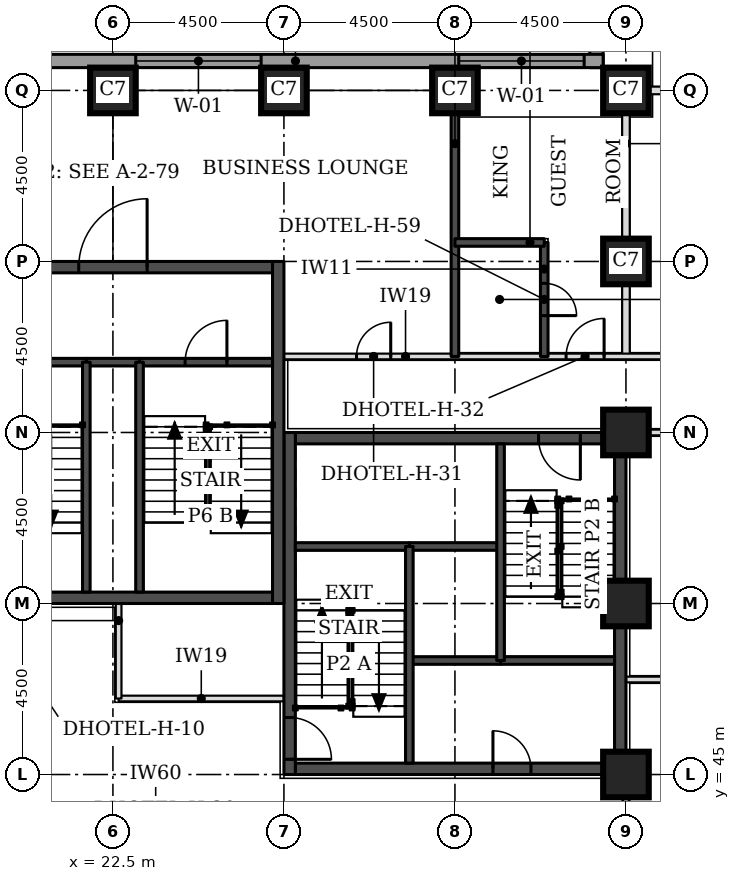
"""IFC4 building model, lengths in metres.
Left out: names, types, materials, properties, quantities, classifications, styles, units other than length and angle.
Written with IfcOpenShell. Run it as: python <this file> out.ifc"""

import sys

from ifc_helpers import new_model, si_unit, direction, frame, frame_2d, origin, origin_2d, place, context, subcontext, project, spatial, rectangle, extrude, element, fill, save


model = new_model("IFC4")
c1 = context("Model", 3, precision=1e-05, world=origin(), true_north=direction((0.0, 1.0)))
c2 = subcontext(c1, "Body", "Model", "MODEL_VIEW")
j1 = project(units=[si_unit("LENGTHUNIT", "METRE"), si_unit("PLANEANGLEUNIT", "RADIAN")], contexts=[c1])
p1 = place(None, origin())
s1 = spatial("IfcSite", under=j1, at=p1, CompositionType="ELEMENT")
p2 = place(p1, origin())
s2 = spatial("IfcBuilding", under=s1, at=p2, CompositionType="ELEMENT")
p3 = place(p2, frame((0.0, 0.0, 46.2)))
s3 = spatial("IfcBuildingStorey", under=s2, at=p3, CompositionType="ELEMENT", Elevation=46.2)
for number, where, z_axis, x_axis in (
    (1, (36.0, 45.0, 0.0), (0.0, 0.0, 1.0), (1.0, 0.0, 0.0)),
    (2, (36.0, 49.5, 0.0), (0.0, 0.0, 1.0), (1.0, 0.0, 0.0)),
    (3, (36.0, 54.0, 0.0), (0.0, 0.0, 1.0), (1.0, 0.0, 0.0)),
    (4, (36.0, 58.5, 0.0), (0.0, 0.0, 1.0), (1.0, 0.0, 0.0)),
    (5, (22.5, 63.0, 0.0), (0.0, 0.0, 1.0), (1.0, 0.0, 0.0)),
    (6, (27.0, 63.0, 0.0), (0.0, 0.0, 1.0), (1.0, 0.0, 0.0)),
    (7, (31.5, 63.0, 0.0), (0.0, 0.0, 1.0), (1.0, 0.0, 0.0)),
    (8, (36.0, 63.0, 0.0), (0.0, 0.0, 1.0), (1.0, 0.0, 0.0)),
):
    element("IfcColumn", number, at=place(p3, frame(where, z_axis=z_axis, x_axis=x_axis)), inside=s3, PredefinedType="COLUMN", context=c2, shape_type="SweptSolid", body=[
        extrude(rectangle(XDim=1.2, YDim=1.2, at=origin_2d()), origin(), (0.0, 0.0, 1.0), 3.3),
    ])
p4 = place(p3, frame((27.3, 45.15, 0.0), z_axis=(0.0, 0.0, 1.0), x_axis=(1.0, 0.0, 0.0)))
e9 = element("IfcWall", 9, at=p4, inside=s3, PredefinedType="SHEAR", context=c2, shape_type="SweptSolid", body=[
    extrude(rectangle(XDim=8.4, YDim=0.3, at=frame_2d((4.2, 0.0))), origin(), (0.0, 0.0, 1.0), 3.3),
])
p5 = place(p4, frame((5.2, 0.0, 0.0)))
e10 = element("IfcOpeningElement", 10, at=p5, cuts=e9, PredefinedType="OPENING", context=c2, shape_type="SweptSolid", body=[
    extrude(rectangle(XDim=1.0, YDim=2.1, at=frame_2d((0.5, 1.05))), frame((0.0, 0.16, 0.0), z_axis=(0.0, -1.0, 0.0), x_axis=(1.0, 0.0, 0.0)), (0.0, 0.0, 1.0), 0.32),
])
p6 = place(p3, frame((27.3, 53.85, 0.0), z_axis=(0.0, 0.0, 1.0), x_axis=(1.0, 0.0, 0.0)))
e11 = element("IfcWall", 11, at=p6, inside=s3, PredefinedType="SHEAR", context=c2, shape_type="SweptSolid", body=[
    extrude(rectangle(XDim=8.4, YDim=0.3, at=frame_2d((4.2, 0.0))), origin(), (0.0, 0.0, 1.0), 3.3),
])
p7 = place(p6, frame((6.4, 0.0, 0.0)))
e12 = element("IfcOpeningElement", 12, at=p7, cuts=e11, PredefinedType="OPENING", context=c2, shape_type="SweptSolid", body=[
    extrude(rectangle(XDim=1.1, YDim=2.1, at=frame_2d((0.55, 1.05))), frame((0.0, 0.16, 0.0), z_axis=(0.0, -1.0, 0.0), x_axis=(1.0, 0.0, 0.0)), (0.0, 0.0, 1.0), 0.32),
])
p8 = place(p3, frame((27.15, 45.0, 0.0), z_axis=(0.0, 0.0, 1.0), x_axis=(0.0, 1.0, 0.0)))
e13 = element("IfcWall", 13, at=p8, inside=s3, PredefinedType="SHEAR", context=c2, shape_type="SweptSolid", body=[
    extrude(rectangle(XDim=9.0, YDim=0.3, at=frame_2d((4.5, 0.0))), origin(), (0.0, 0.0, 1.0), 3.3),
])
p9 = place(p8, frame((0.4, 0.0, 0.0)))
e14 = element("IfcOpeningElement", 14, at=p9, cuts=e13, PredefinedType="OPENING", context=c2, shape_type="SweptSolid", body=[
    extrude(rectangle(XDim=1.1, YDim=2.1, at=frame_2d((0.55, 1.05))), frame((0.0, 0.16, 0.0), z_axis=(0.0, -1.0, 0.0), x_axis=(1.0, 0.0, 0.0)), (0.0, 0.0, 1.0), 0.32),
])
p10 = place(p3, frame((35.85, 45.0, 0.0), z_axis=(0.0, 0.0, 1.0), x_axis=(0.0, 1.0, 0.0)))
e15 = element("IfcWall", 15, at=p10, inside=s3, PredefinedType="SHEAR", context=c2, shape_type="SweptSolid", body=[
    extrude(rectangle(XDim=9.0, YDim=0.3, at=frame_2d((4.5, 0.0))), origin(), (0.0, 0.0, 1.0), 3.3),
])
p11 = place(p3, frame((18.3, 49.65, 0.0), z_axis=(0.0, 0.0, 1.0), x_axis=(1.0, 0.0, 0.0)))
e16 = element("IfcWall", 16, at=p11, inside=s3, PredefinedType="SHEAR", context=c2, shape_type="SweptSolid", body=[
    extrude(rectangle(XDim=8.4, YDim=0.3, at=frame_2d((4.2, 0.0))), origin(), (0.0, 0.0, 1.0), 3.3),
])
p12 = place(p3, frame((18.3, 58.35, 0.0), z_axis=(0.0, 0.0, 1.0), x_axis=(1.0, 0.0, 0.0)))
e17 = element("IfcWall", 17, at=p12, inside=s3, PredefinedType="SHEAR", context=c2, shape_type="SweptSolid", body=[
    extrude(rectangle(XDim=8.4, YDim=0.3, at=frame_2d((4.2, 0.0))), origin(), (0.0, 0.0, 1.0), 3.3),
])
p13 = place(p12, frame((3.3, 0.0, 0.0)))
e18 = element("IfcOpeningElement", 18, at=p13, cuts=e17, PredefinedType="OPENING", context=c2, shape_type="SweptSolid", body=[
    extrude(rectangle(XDim=1.8, YDim=2.1, at=frame_2d((0.9, 1.05))), frame((0.0, 0.16, 0.0), z_axis=(0.0, -1.0, 0.0), x_axis=(1.0, 0.0, 0.0)), (0.0, 0.0, 1.0), 0.32),
])
p14 = place(p3, frame((26.85, 49.5, 0.0), z_axis=(0.0, 0.0, 1.0), x_axis=(0.0, 1.0, 0.0)))
e19 = element("IfcWall", 19, at=p14, inside=s3, PredefinedType="SHEAR", context=c2, shape_type="SweptSolid", body=[
    extrude(rectangle(XDim=9.0, YDim=0.3, at=frame_2d((4.5, 0.0))), origin(), (0.0, 0.0, 1.0), 3.3),
])
p15 = place(p3, frame((35.225, 76.894, 0.0), z_axis=(0.0, 0.0, 1.0), x_axis=(0.0, -1.0, 0.0)))
e20 = element("IfcWall", 20, at=p15, inside=s3, PredefinedType="STANDARD", context=c2, shape_type="SweptSolid", body=[
    extrude(rectangle(XDim=13.293, YDim=0.35, at=frame_2d((6.647, 0.0))), origin(), (0.0, 0.0, 1.0), 3.055),
])
p16 = place(p15, frame((9.493, 0.0, 0.8)))
e21 = element("IfcOpeningElement", 21, at=p16, cuts=e20, PredefinedType="OPENING", context=c2, shape_type="SweptSolid", body=[
    extrude(rectangle(XDim=3.3, YDim=1.5, at=frame_2d((1.65, 0.75))), frame((0.0, 0.185, 0.0), z_axis=(0.0, -1.0, 0.0), x_axis=(1.0, 0.0, 0.0)), (0.0, 0.0, 1.0), 0.37),
])
p17 = place(p3, frame((35.4, 63.775, 0.0), z_axis=(0.0, 0.0, 1.0), x_axis=(-1.0, 0.0, 0.0)))
e22 = element("IfcWall", 22, at=p17, inside=s3, PredefinedType="STANDARD", context=c2, shape_type="SweptSolid", body=[
    extrude(rectangle(XDim=17.793, YDim=0.35, at=frame_2d((8.897, 0.0))), origin(), (0.0, 0.0, 1.0), 3.055),
])
p18 = place(p17, frame((0.5, 0.0, 0.8)))
e23 = element("IfcOpeningElement", 23, at=p18, cuts=e22, PredefinedType="OPENING", context=c2, shape_type="SweptSolid", body=[
    extrude(rectangle(XDim=3.3, YDim=1.5, at=frame_2d((1.65, 0.75))), frame((0.0, 0.185, 0.0), z_axis=(0.0, -1.0, 0.0), x_axis=(1.0, 0.0, 0.0)), (0.0, 0.0, 1.0), 0.37),
])
p19 = place(p17, frame((9.0, 0.0, 0.8)))
e24 = element("IfcOpeningElement", 24, at=p19, cuts=e22, PredefinedType="OPENING", context=c2, shape_type="SweptSolid", body=[
    extrude(rectangle(XDim=3.3, YDim=1.5, at=frame_2d((1.65, 0.75))), frame((0.0, 0.185, 0.0), z_axis=(0.0, -1.0, 0.0), x_axis=(1.0, 0.0, 0.0)), (0.0, 0.0, 1.0), 0.37),
])
p20 = place(p3, frame((36.0, 56.0, 0.0), z_axis=(0.0, 0.0, 1.0), x_axis=(0.0, 1.0, 0.0)))
e25 = element("IfcWall", 25, at=p20, inside=s3, PredefinedType="PARTITIONING", context=c2, shape_type="SweptSolid", body=[
    extrude(rectangle(XDim=6.4, YDim=0.2, at=frame_2d((3.2, 0.0))), origin(), (0.0, 0.0, 1.0), 2.33),
])
p21 = place(p3, frame((36.6, 63.0, 0.0), z_axis=(0.0, 0.0, 1.0), x_axis=(1.0, 0.0, 0.0)))
e26 = element("IfcWall", 26, at=p21, inside=s3, PredefinedType="PARTITIONING", context=c2, shape_type="SweptSolid", body=[
    extrude(rectangle(XDim=6.4, YDim=0.2, at=frame_2d((3.2, 0.0))), origin(), (0.0, 0.0, 1.0), 3.08),
])
p22 = place(p3, frame((36.0, 40.55, 0.0), z_axis=(0.0, 0.0, 1.0), x_axis=(0.0, 1.0, 0.0)))
e27 = element("IfcWall", 27, at=p22, inside=s3, PredefinedType="PARTITIONING", context=c2, shape_type="SweptSolid", body=[
    extrude(rectangle(XDim=4.4, YDim=0.15, at=frame_2d((2.2, 0.0))), origin(), (0.0, 0.0, 1.0), 2.33),
])
p23 = place(p3, frame((22.65, 47.0, 0.0), z_axis=(0.0, 0.0, 1.0), x_axis=(1.0, 0.0, 0.0)))
e28 = element("IfcWall", 28, at=p23, inside=s3, PredefinedType="PARTITIONING", context=c2, shape_type="SweptSolid", body=[
    extrude(rectangle(XDim=4.35, YDim=0.15, at=frame_2d((2.175, 0.0))), origin(), (0.0, 0.0, 1.0), 3.08),
])
p24 = place(p3, frame((22.65, 47.0, 0.0), z_axis=(0.0, 0.0, 1.0), x_axis=(0.0, 1.0, 0.0)))
e29 = element("IfcWall", 29, at=p24, inside=s3, PredefinedType="PARTITIONING", context=c2, shape_type="SweptSolid", body=[
    extrude(rectangle(XDim=2.5, YDim=0.15, at=frame_2d((1.25, 0.0))), origin(), (0.0, 0.0, 1.0), 3.08),
])
p25 = place(p3, frame((36.05, 54.0, 0.0), z_axis=(0.0, 0.0, 1.0), x_axis=(1.0, 0.0, 0.0)))
e30 = element("IfcWall", 30, at=p25, inside=s3, PredefinedType="PARTITIONING", context=c2, shape_type="SweptSolid", body=[
    extrude(rectangle(XDim=6.95, YDim=0.15, at=frame_2d((3.475, 0.0))), origin(), (0.0, 0.0, 1.0), 3.08),
])
p26 = place(p25, frame((3.0, 0.0, 0.0)))
e31 = element("IfcOpeningElement", 31, at=p26, cuts=e30, PredefinedType="OPENING", context=c2, shape_type="SweptSolid", body=[
    extrude(rectangle(XDim=0.9, YDim=2.1, at=frame_2d((0.45, 1.05))), frame((0.0, 0.085, 0.0), z_axis=(0.0, -1.0, 0.0), x_axis=(1.0, 0.0, 0.0)), (0.0, 0.0, 1.0), 0.17),
])
p27 = place(p3, frame((27.0, 56.0, 0.0), z_axis=(0.0, 0.0, 1.0), x_axis=(1.0, 0.0, 0.0)))
e32 = element("IfcWall", 32, at=p27, inside=s3, PredefinedType="PARTITIONING", context=c2, shape_type="SweptSolid", body=[
    extrude(rectangle(XDim=16.0, YDim=0.15, at=frame_2d((8.0, 0.0))), origin(), (0.0, 0.0, 1.0), 3.08),
])
p28 = place(p27, frame((7.425, 0.0, 0.0)))
e33 = element("IfcOpeningElement", 33, at=p28, cuts=e32, PredefinedType="OPENING", context=c2, shape_type="SweptSolid", body=[
    extrude(rectangle(XDim=1.0, YDim=2.1, at=frame_2d((0.5, 1.05))), frame((0.0, 0.085, 0.0), z_axis=(0.0, -1.0, 0.0), x_axis=(1.0, 0.0, 0.0)), (0.0, 0.0, 1.0), 0.17),
])
p29 = place(p27, frame((1.91, 0.0, 0.0)))
e34 = element("IfcOpeningElement", 34, at=p29, cuts=e32, PredefinedType="OPENING", context=c2, shape_type="SweptSolid", body=[
    extrude(rectangle(XDim=0.9, YDim=2.1, at=frame_2d((0.45, 1.05))), frame((0.0, 0.085, 0.0), z_axis=(0.0, -1.0, 0.0), x_axis=(1.0, 0.0, 0.0)), (0.0, 0.0, 1.0), 0.17),
])
p30 = place(p3, frame((31.5, 56.0, 0.0), z_axis=(0.0, 0.0, 1.0), x_axis=(0.0, 1.0, 0.0)))
e35 = element("IfcWall", 35, at=p30, inside=s3, PredefinedType="SOLIDWALL", context=c2, shape_type="SweptSolid", body=[
    extrude(rectangle(XDim=6.4, YDim=0.2, at=frame_2d((3.2, 0.0))), origin(), (0.0, 0.0, 1.0), 3.08),
])
p31 = place(p3, frame((33.85, 56.0, 0.0), z_axis=(0.0, 0.0, 1.0), x_axis=(0.0, 1.0, 0.0)))
e36 = element("IfcWall", 36, at=p31, inside=s3, PredefinedType="SOLIDWALL", context=c2, shape_type="SweptSolid", body=[
    extrude(rectangle(XDim=3.0, YDim=0.2, at=frame_2d((1.5, 0.0))), origin(), (0.0, 0.0, 1.0), 3.08),
])
p32 = place(p31, frame((1.075, 0.0, 0.0)))
e37 = element("IfcOpeningElement", 37, at=p32, cuts=e36, PredefinedType="OPENING", context=c2, shape_type="SweptSolid", body=[
    extrude(rectangle(XDim=0.85, YDim=2.1, at=frame_2d((0.425, 1.05))), frame((0.0, 0.11, 0.0), z_axis=(0.0, -1.0, 0.0), x_axis=(1.0, 0.0, 0.0)), (0.0, 0.0, 1.0), 0.22),
])
p33 = place(p3, frame((31.5, 59.0, 0.0), z_axis=(0.0, 0.0, 1.0), x_axis=(1.0, 0.0, 0.0)))
e38 = element("IfcWall", 38, at=p33, inside=s3, PredefinedType="SOLIDWALL", context=c2, shape_type="SweptSolid", body=[
    extrude(rectangle(XDim=2.35, YDim=0.2, at=frame_2d((1.175, 0.0))), origin(), (0.0, 0.0, 1.0), 3.08),
])
p34 = place(p3, frame((36.0, 47.5, 0.0), z_axis=(0.0, 0.0, 1.0), x_axis=(1.0, 0.0, 0.0)))
e39 = element("IfcWall", 39, at=p34, inside=s3, PredefinedType="PARTITIONING", context=c2, shape_type="SweptSolid", body=[
    extrude(rectangle(XDim=7.0, YDim=0.15, at=frame_2d((3.5, 0.0))), origin(), (0.0, 0.0, 1.0), 3.08),
])
p35 = place(p3, frame((30.3, 48.0, 0.0), z_axis=(0.0, 0.0, 1.0), x_axis=(1.0, 0.0, 0.0)))
e40 = element("IfcWall", 40, at=p35, inside=s3, PredefinedType="SOLIDWALL", context=c2, shape_type="SweptSolid", body=[
    extrude(rectangle(XDim=2.4, YDim=0.2, at=frame_2d((1.2, 0.0))), origin(), (0.0, 0.0, 1.0), 3.08),
])
p36 = place(p3, frame((32.7, 48.0, 0.0), z_axis=(0.0, 0.0, 1.0), x_axis=(1.0, 0.0, 0.0)))
e41 = element("IfcWall", 41, at=p36, inside=s3, PredefinedType="SOLIDWALL", context=c2, shape_type="SweptSolid", body=[
    extrude(rectangle(XDim=3.0, YDim=0.2, at=frame_2d((1.5, 0.0))), origin(), (0.0, 0.0, 1.0), 3.08),
])
p37 = place(p3, frame((30.3, 51.0, 0.0), z_axis=(0.0, 0.0, 1.0), x_axis=(1.0, 0.0, 0.0)))
e42 = element("IfcWall", 42, at=p37, inside=s3, PredefinedType="SOLIDWALL", context=c2, shape_type="SweptSolid", body=[
    extrude(rectangle(XDim=2.4, YDim=0.2, at=frame_2d((1.2, 0.0))), origin(), (0.0, 0.0, 1.0), 3.3),
])
p38 = place(p3, frame((27.3, 51.0, 0.0), z_axis=(0.0, 0.0, 1.0), x_axis=(1.0, 0.0, 0.0)))
e43 = element("IfcWall", 43, at=p38, inside=s3, PredefinedType="SOLIDWALL", context=c2, shape_type="SweptSolid", body=[
    extrude(rectangle(XDim=3.0, YDim=0.2, at=frame_2d((1.5, 0.0))), origin(), (0.0, 0.0, 1.0), 3.08),
])
for number, where, z_axis, x_axis in (
    (44, (30.3, 45.3, 0.0), (0.0, 0.0, 1.0), (0.0, 1.0, 0.0)),
    (45, (32.7, 48.0, 0.0), (0.0, 0.0, 1.0), (0.0, 1.0, 0.0)),
):
    element("IfcWall", number, at=place(p3, frame(where, z_axis=z_axis, x_axis=x_axis)), inside=s3, PredefinedType="SOLIDWALL", context=c2, shape_type="SweptSolid", body=[
        extrude(rectangle(XDim=5.7, YDim=0.2, at=frame_2d((2.85, 0.0))), origin(), (0.0, 0.0, 1.0), 3.08),
    ])
p39 = place(p3, frame((21.8, 55.85, 0.0), z_axis=(0.0, 0.0, 1.0), x_axis=(1.0, 0.0, 0.0)))
e46 = element("IfcWall", 46, at=p39, inside=s3, PredefinedType="SOLIDWALL", context=c2, shape_type="SweptSolid", body=[
    extrude(rectangle(XDim=1.4, YDim=0.2, at=frame_2d((0.7, 0.0))), origin(), (0.0, 0.0, 1.0), 3.08),
])
p40 = place(p3, frame((18.3, 55.85, 0.0), z_axis=(0.0, 0.0, 1.0), x_axis=(1.0, 0.0, 0.0)))
e47 = element("IfcWall", 47, at=p40, inside=s3, PredefinedType="SOLIDWALL", context=c2, shape_type="SweptSolid", body=[
    extrude(rectangle(XDim=3.5, YDim=0.2, at=frame_2d((1.75, 0.0))), origin(), (0.0, 0.0, 1.0), 3.08),
])
p41 = place(p40, frame((1.2, 0.0, 0.0)))
e48 = element("IfcOpeningElement", 48, at=p41, cuts=e47, PredefinedType="OPENING", context=c2, shape_type="SweptSolid", body=[
    extrude(rectangle(XDim=1.1, YDim=2.1, at=frame_2d((0.55, 1.05))), frame((0.0, 0.11, 0.0), z_axis=(0.0, -1.0, 0.0), x_axis=(1.0, 0.0, 0.0)), (0.0, 0.0, 1.0), 0.22),
])
p42 = place(p3, frame((23.2, 55.85, 0.0), z_axis=(0.0, 0.0, 1.0), x_axis=(1.0, 0.0, 0.0)))
e49 = element("IfcWall", 49, at=p42, inside=s3, PredefinedType="SOLIDWALL", context=c2, shape_type="SweptSolid", body=[
    extrude(rectangle(XDim=3.5, YDim=0.2, at=frame_2d((1.75, 0.0))), origin(), (0.0, 0.0, 1.0), 3.08),
])
p43 = place(p42, frame((1.2, 0.0, 0.0)))
e50 = element("IfcOpeningElement", 50, at=p43, cuts=e49, PredefinedType="OPENING", context=c2, shape_type="SweptSolid", body=[
    extrude(rectangle(XDim=1.1, YDim=2.1, at=frame_2d((0.55, 1.05))), frame((0.0, 0.11, 0.0), z_axis=(0.0, -1.0, 0.0), x_axis=(1.0, 0.0, 0.0)), (0.0, 0.0, 1.0), 0.22),
])
for number, where, z_axis, x_axis in (
    (51, (21.8, 49.8, 0.0), (0.0, 0.0, 1.0), (0.0, 1.0, 0.0)),
    (52, (23.2, 49.8, 0.0), (0.0, 0.0, 1.0), (0.0, 1.0, 0.0)),
):
    element("IfcWall", number, at=place(p3, frame(where, z_axis=z_axis, x_axis=x_axis)), inside=s3, PredefinedType="SOLIDWALL", context=c2, shape_type="SweptSolid", body=[
        extrude(rectangle(XDim=6.05, YDim=0.2, at=frame_2d((3.025, 0.0))), origin(), (0.0, 0.0, 1.0), 3.08),
    ])
p44 = place(p18, origin())
e53 = element("IfcWindow", 53, at=p44, inside=s3, PartitioningType="SINGLE_PANEL", PredefinedType="WINDOW", context=c2, shape_type="SweptSolid", body=[
    extrude(rectangle(XDim=3.3, YDim=1.5, at=frame_2d((1.65, 0.75))), frame((0.0, 0.085, 0.0), z_axis=(0.0, -1.0, 0.0), x_axis=(1.0, 0.0, 0.0)), (0.0, 0.0, 1.0), 0.06),
])
fill(e23, e53)
p45 = place(p19, origin())
e54 = element("IfcWindow", 54, at=p45, inside=s3, PartitioningType="SINGLE_PANEL", PredefinedType="WINDOW", context=c2, shape_type="SweptSolid", body=[
    extrude(rectangle(XDim=3.3, YDim=1.5, at=frame_2d((1.65, 0.75))), frame((0.0, 0.085, 0.0), z_axis=(0.0, -1.0, 0.0), x_axis=(1.0, 0.0, 0.0)), (0.0, 0.0, 1.0), 0.06),
])
fill(e24, e54)
p46 = place(p28, origin())
e55 = element("IfcDoor", 55, at=p46, inside=s3, OperationType="SINGLE_SWING_RIGHT", PredefinedType="DOOR", context=c2, shape_type="SweptSolid", body=[
    extrude(rectangle(XDim=1.0, YDim=2.1, at=frame_2d((0.5, 1.05))), frame((0.0, 0.025, 0.0), z_axis=(0.0, -1.0, 0.0), x_axis=(1.0, 0.0, 0.0)), (0.0, 0.0, 1.0), 0.05),
])
fill(e33, e55)
p47 = place(p32, frame((0.85, 0.0, 0.0), z_axis=(0.0, 0.0, 1.0), x_axis=(-1.0, 0.0, 0.0)))
e56 = element("IfcDoor", 56, at=p47, inside=s3, OperationType="SINGLE_SWING_RIGHT", PredefinedType="DOOR", context=c2, shape_type="SweptSolid", body=[
    extrude(rectangle(XDim=0.85, YDim=2.1, at=frame_2d((0.425, 1.05))), frame((0.0, 0.025, 0.0), z_axis=(0.0, -1.0, 0.0), x_axis=(1.0, 0.0, 0.0)), (0.0, 0.0, 1.0), 0.05),
])
fill(e37, e56)
p48 = place(p29, origin())
e57 = element("IfcDoor", 57, at=p48, inside=s3, OperationType="SINGLE_SWING_RIGHT", PredefinedType="DOOR", context=c2, shape_type="SweptSolid", body=[
    extrude(rectangle(XDim=0.9, YDim=2.1, at=frame_2d((0.45, 1.05))), frame((0.0, 0.025, 0.0), z_axis=(0.0, -1.0, 0.0), x_axis=(1.0, 0.0, 0.0)), (0.0, 0.0, 1.0), 0.05),
])
fill(e34, e57)
p49 = place(p9, frame((1.1, 0.0, 0.0), z_axis=(0.0, 0.0, 1.0), x_axis=(-1.0, 0.0, 0.0)))
e58 = element("IfcDoor", 58, at=p49, inside=s3, OperationType="SINGLE_SWING_RIGHT", PredefinedType="DOOR", context=c2, shape_type="SweptSolid", body=[
    extrude(rectangle(XDim=1.1, YDim=2.1, at=frame_2d((0.55, 1.05))), frame((0.0, 0.025, 0.0), z_axis=(0.0, -1.0, 0.0), x_axis=(1.0, 0.0, 0.0)), (0.0, 0.0, 1.0), 0.05),
])
fill(e14, e58)
p50 = place(p7, frame((1.1, 0.0, 0.0), z_axis=(0.0, 0.0, 1.0), x_axis=(-1.0, 0.0, 0.0)))
e59 = element("IfcDoor", 59, at=p50, inside=s3, OperationType="SINGLE_SWING_LEFT", PredefinedType="DOOR", context=c2, shape_type="SweptSolid", body=[
    extrude(rectangle(XDim=1.1, YDim=2.1, at=frame_2d((0.55, 1.05))), frame((0.0, 0.025, 0.0), z_axis=(0.0, -1.0, 0.0), x_axis=(1.0, 0.0, 0.0)), (0.0, 0.0, 1.0), 0.05),
])
fill(e12, e59)
p51 = place(p5, origin())
e60 = element("IfcDoor", 60, at=p51, inside=s3, OperationType="SINGLE_SWING_LEFT", PredefinedType="DOOR", context=c2, shape_type="SweptSolid", body=[
    extrude(rectangle(XDim=1.0, YDim=2.1, at=frame_2d((0.5, 1.05))), frame((0.0, 0.025, 0.0), z_axis=(0.0, -1.0, 0.0), x_axis=(1.0, 0.0, 0.0)), (0.0, 0.0, 1.0), 0.05),
])
fill(e10, e60)
p52 = place(p43, origin())
e61 = element("IfcDoor", 61, at=p52, inside=s3, OperationType="SINGLE_SWING_RIGHT", PredefinedType="DOOR", context=c2, shape_type="SweptSolid", body=[
    extrude(rectangle(XDim=1.1, YDim=2.1, at=frame_2d((0.55, 1.05))), frame((0.0, 0.025, 0.0), z_axis=(0.0, -1.0, 0.0), x_axis=(1.0, 0.0, 0.0)), (0.0, 0.0, 1.0), 0.05),
])
fill(e50, e61)
p53 = place(p13, origin())
e62 = element("IfcDoor", 62, at=p53, inside=s3, OperationType="SINGLE_SWING_RIGHT", PredefinedType="DOOR", context=c2, shape_type="SweptSolid", body=[
    extrude(rectangle(XDim=1.8, YDim=2.1, at=frame_2d((0.9, 1.05))), frame((0.0, 0.025, 0.0), z_axis=(0.0, -1.0, 0.0), x_axis=(1.0, 0.0, 0.0)), (0.0, 0.0, 1.0), 0.05),
])
fill(e18, e62)
save(model, sys.argv[1])
